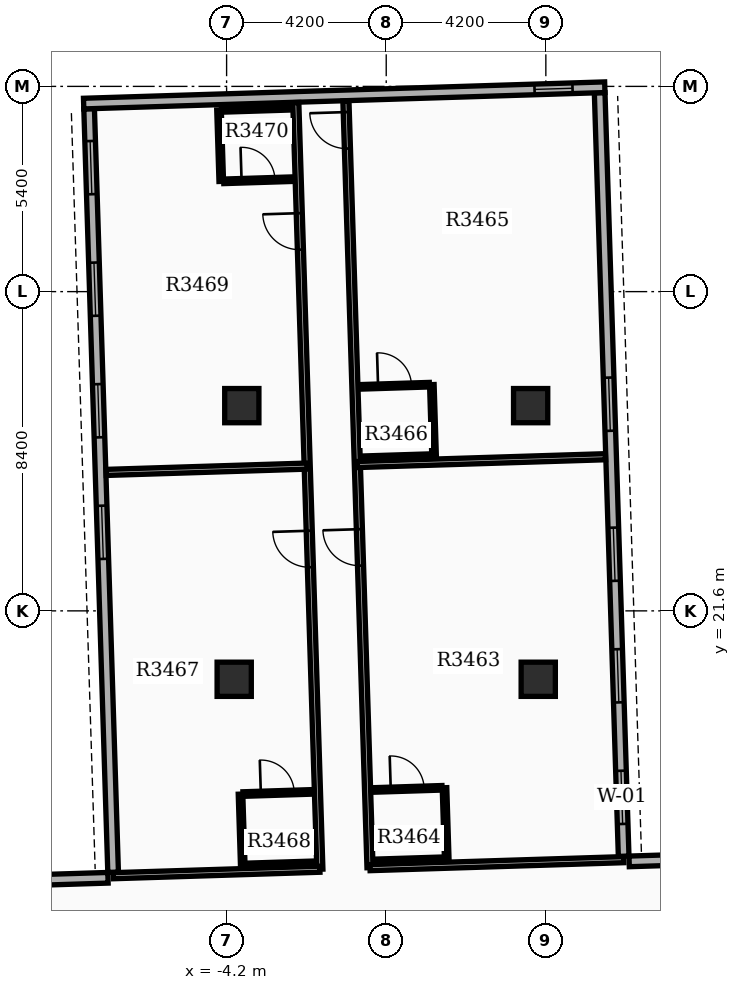
"""IFC4 building model, lengths in metres.
Left out: names, types, materials, properties, quantities, classifications, styles, units other than length and angle.
Written with IfcOpenShell. Run it as: python <this file> out.ifc"""

import sys

from ifc_helpers import new_model, si_unit, direction, frame, frame_2d, origin, origin_2d, place, context, subcontext, project, spatial, rectangle, extrude, element, fill, save


model = new_model("IFC4")
c1 = context("Model", 3, precision=1e-05, world=origin(), true_north=direction((0.0, 1.0)))
c2 = subcontext(c1, "Body", "Model", "MODEL_VIEW")
j1 = project(units=[si_unit("LENGTHUNIT", "METRE"), si_unit("PLANEANGLEUNIT", "RADIAN")], contexts=[c1])
p1 = place(None, origin())
s1 = spatial("IfcSite", under=j1, at=p1, CompositionType="ELEMENT")
p2 = place(p1, origin())
s2 = spatial("IfcBuilding", under=s1, at=p2, CompositionType="ELEMENT")
p3 = place(p2, frame((0.0, 0.0, 216.9)))
s3 = spatial("IfcBuildingStorey", under=s2, at=p3, CompositionType="ELEMENT", Elevation=216.9)
for number, where, z_axis, x_axis in (
    (1, (-4.0, 19.8, 0.0), (0.0, 0.0, 1.0), (1.0, 0.0, 0.0)),
    (2, (4.0, 19.8, 0.0), (0.0, 0.0, 1.0), (1.0, 0.0, 0.0)),
    (3, (-3.8, 27.0, 0.0), (0.0, 0.0, 1.0), (1.0, 0.0, 0.0)),
    (4, (3.8, 27.0, 0.0), (0.0, 0.0, 1.0), (1.0, 0.0, 0.0)),
):
    element("IfcColumn", number, at=place(p3, frame(where, z_axis=z_axis, x_axis=x_axis)), inside=s3, PredefinedType="COLUMN", context=c2, shape_type="SweptSolid", body=[
        extrude(rectangle(XDim=0.9, YDim=0.9, at=origin_2d()), origin(), (0.0, 0.0, 1.0), 3.9),
    ])
p4 = place(p3, frame((6.247, 15.144, 0.0), z_axis=(0.0, 0.0, 1.0), x_axis=(-0.031398187845, 0.999506955354, 0.0)))
e5 = element("IfcWall", 5, at=p4, inside=s3, PredefinedType="STANDARD", context=c2, shape_type="SweptSolid", body=[
    extrude(rectangle(XDim=20.1, YDim=0.28, at=frame_2d((10.05, 0.0))), origin(), (0.0, 0.0, 1.0), 3.18),
])
p5 = place(p4, frame((0.85, 0.0, 0.8)))
e6 = element("IfcOpeningElement", 6, at=p5, cuts=e5, PredefinedType="OPENING", context=c2, shape_type="SweptSolid", body=[
    extrude(rectangle(XDim=1.4, YDim=1.6, at=frame_2d((0.7, 0.8))), frame((0.0, 0.15, 0.0), z_axis=(0.0, -1.0, 0.0), x_axis=(1.0, 0.0, 0.0)), (0.0, 0.0, 1.0), 0.3),
])
p6 = place(p4, frame((4.05, 0.0, 0.8)))
e7 = element("IfcOpeningElement", 7, at=p6, cuts=e5, PredefinedType="OPENING", context=c2, shape_type="SweptSolid", body=[
    extrude(rectangle(XDim=1.4, YDim=1.6, at=frame_2d((0.7, 0.8))), frame((0.0, 0.15, 0.0), z_axis=(0.0, -1.0, 0.0), x_axis=(1.0, 0.0, 0.0)), (0.0, 0.0, 1.0), 0.3),
])
p7 = place(p4, frame((7.25, 0.0, 0.8)))
e8 = element("IfcOpeningElement", 8, at=p7, cuts=e5, PredefinedType="OPENING", context=c2, shape_type="SweptSolid", body=[
    extrude(rectangle(XDim=1.4, YDim=1.6, at=frame_2d((0.7, 0.8))), frame((0.0, 0.15, 0.0), z_axis=(0.0, -1.0, 0.0), x_axis=(1.0, 0.0, 0.0)), (0.0, 0.0, 1.0), 0.3),
])
p8 = place(p4, frame((11.2, 0.0, 0.8)))
e9 = element("IfcOpeningElement", 9, at=p8, cuts=e5, PredefinedType="OPENING", context=c2, shape_type="SweptSolid", body=[
    extrude(rectangle(XDim=1.4, YDim=1.6, at=frame_2d((0.7, 0.8))), frame((0.0, 0.15, 0.0), z_axis=(0.0, -1.0, 0.0), x_axis=(1.0, 0.0, 0.0)), (0.0, 0.0, 1.0), 0.3),
])
p9 = place(p3, frame((-7.817, 34.812, 0.0), z_axis=(0.0, 0.0, 1.0), x_axis=(0.031410322165, -0.999506574096, 0.0)))
e10 = element("IfcWall", 10, at=p9, inside=s3, PredefinedType="STANDARD", context=c2, shape_type="SweptSolid", body=[
    extrude(rectangle(XDim=20.1, YDim=0.28, at=frame_2d((10.05, 0.0))), origin(), (0.0, 0.0, 1.0), 3.18),
])
p10 = place(p9, frame((0.85, 0.0, 0.8)))
e11 = element("IfcOpeningElement", 11, at=p10, cuts=e10, PredefinedType="OPENING", context=c2, shape_type="SweptSolid", body=[
    extrude(rectangle(XDim=1.4, YDim=1.6, at=frame_2d((0.7, 0.8))), frame((0.0, 0.15, 0.0), z_axis=(0.0, -1.0, 0.0), x_axis=(1.0, 0.0, 0.0)), (0.0, 0.0, 1.0), 0.3),
])
p11 = place(p9, frame((4.05, 0.0, 0.8)))
e12 = element("IfcOpeningElement", 12, at=p11, cuts=e10, PredefinedType="OPENING", context=c2, shape_type="SweptSolid", body=[
    extrude(rectangle(XDim=1.4, YDim=1.6, at=frame_2d((0.7, 0.8))), frame((0.0, 0.15, 0.0), z_axis=(0.0, -1.0, 0.0), x_axis=(1.0, 0.0, 0.0)), (0.0, 0.0, 1.0), 0.3),
])
p12 = place(p9, frame((7.25, 0.0, 0.8)))
e13 = element("IfcOpeningElement", 13, at=p12, cuts=e10, PredefinedType="OPENING", context=c2, shape_type="SweptSolid", body=[
    extrude(rectangle(XDim=1.4, YDim=1.6, at=frame_2d((0.7, 0.8))), frame((0.0, 0.15, 0.0), z_axis=(0.0, -1.0, 0.0), x_axis=(1.0, 0.0, 0.0)), (0.0, 0.0, 1.0), 0.3),
])
p13 = place(p9, frame((10.45, 0.0, 0.8)))
e14 = element("IfcOpeningElement", 14, at=p13, cuts=e10, PredefinedType="OPENING", context=c2, shape_type="SweptSolid", body=[
    extrude(rectangle(XDim=1.4, YDim=1.6, at=frame_2d((0.7, 0.8))), frame((0.0, 0.15, 0.0), z_axis=(0.0, -1.0, 0.0), x_axis=(1.0, 0.0, 0.0)), (0.0, 0.0, 1.0), 0.3),
])
p14 = place(p3, frame((5.752, 35.378, 0.0), z_axis=(0.0, 0.0, 1.0), x_axis=(-0.999506679556, -0.031406966164, 0.0)))
e15 = element("IfcWall", 15, at=p14, inside=s3, PredefinedType="STANDARD", context=c2, shape_type="SweptSolid", body=[
    extrude(rectangle(XDim=13.72, YDim=0.28, at=frame_2d((6.86, 0.0))), origin(), (0.0, 0.0, 1.0), 3.18),
])
p15 = place(p14, frame((0.85, 0.0, 0.85)))
e16 = element("IfcOpeningElement", 16, at=p15, cuts=e15, PredefinedType="OPENING", context=c2, shape_type="SweptSolid", body=[
    extrude(rectangle(XDim=1.0, YDim=1.5, at=frame_2d((0.5, 0.75))), frame((0.0, 0.15, 0.0), z_axis=(0.0, -1.0, 0.0), x_axis=(1.0, 0.0, 0.0)), (0.0, 0.0, 1.0), 0.3),
])
p16 = place(p3, frame((12.689, 15.206, 0.0), z_axis=(0.0, 0.0, 1.0), x_axis=(-0.999507262922, -0.031388395416, 0.0)))
e17 = element("IfcWall", 17, at=p16, inside=s3, PredefinedType="STANDARD", context=c2, shape_type="SweptSolid", body=[
    extrude(rectangle(XDim=6.3, YDim=0.28, at=frame_2d((3.15, 0.0))), origin(), (0.0, 0.0, 1.0), 3.18),
])
p17 = place(p3, frame((-13.618, 14.379, 0.0), z_axis=(0.0, 0.0, 1.0), x_axis=(0.999507224741, 0.031389611199, 0.0)))
e18 = element("IfcWall", 18, at=p17, inside=s3, PredefinedType="STANDARD", context=c2, shape_type="SweptSolid", body=[
    extrude(rectangle(XDim=6.3, YDim=0.28, at=frame_2d((3.15, 0.0))), origin(), (0.0, 0.0, 1.0), 3.18),
])
p18 = place(p3, frame((-0.427, 14.844, 0.0), z_axis=(0.0, 0.0, 1.0), x_axis=(-0.031415650687, 0.999506406629, 0.0)))
e19 = element("IfcWall", 19, at=p18, inside=s3, PredefinedType="PARTITIONING", context=c2, shape_type="SweptSolid", body=[
    extrude(rectangle(XDim=20.182, YDim=0.16, at=frame_2d((10.091, 0.0))), origin(), (0.0, 0.0, 1.0), 3.17),
])
p19 = place(p18, frame((7.95, 0.0, 0.0)))
e20 = element("IfcOpeningElement", 20, at=p19, cuts=e19, PredefinedType="OPENING", context=c2, shape_type="SweptSolid", body=[
    extrude(rectangle(XDim=0.96, YDim=2.15, at=frame_2d((0.48, 1.075))), frame((0.0, 0.09, 0.0), z_axis=(0.0, -1.0, 0.0), x_axis=(1.0, 0.0, 0.0)), (0.0, 0.0, 1.0), 0.18),
])
p20 = place(p18, frame((18.93, 0.0, 0.0)))
e21 = element("IfcOpeningElement", 21, at=p20, cuts=e19, PredefinedType="OPENING", context=c2, shape_type="SweptSolid", body=[
    extrude(rectangle(XDim=0.96, YDim=2.15, at=frame_2d((0.48, 1.075))), frame((0.0, 0.09, 0.0), z_axis=(0.0, -1.0, 0.0), x_axis=(1.0, 0.0, 0.0)), (0.0, 0.0, 1.0), 0.18),
])
p21 = place(p3, frame((-0.427, 14.844, 0.0), z_axis=(0.0, 0.0, 1.0), x_axis=(0.999507071439, 0.031394492261, 0.0)))
e22 = element("IfcWall", 22, at=p21, inside=s3, PredefinedType="PARTITIONING", context=c2, shape_type="SweptSolid", body=[
    extrude(rectangle(XDim=6.68, YDim=0.16, at=frame_2d((3.34, 0.0))), origin(), (0.0, 0.0, 1.0), 3.17),
])
p22 = place(p3, frame((-0.76, 25.451, 0.0), z_axis=(0.0, 0.0, 1.0), x_axis=(0.999505857476, 0.031433117423, 0.0)))
e23 = element("IfcWall", 23, at=p22, inside=s3, PredefinedType="PARTITIONING", context=c2, shape_type="SweptSolid", body=[
    extrude(rectangle(XDim=6.532, YDim=0.16, at=frame_2d((3.266, 0.0))), origin(), (0.0, 0.0, 1.0), 3.17),
])
p23 = place(p3, frame((-0.351, 16.887, 0.0), z_axis=(0.0, 0.0, 1.0), x_axis=(0.999503004171, 0.03152371574, 0.0)))
e24 = element("IfcWall", 24, at=p23, inside=s3, PredefinedType="PARTITIONING", context=c2, shape_type="SweptSolid", body=[
    extrude(rectangle(XDim=1.82, YDim=0.12, at=frame_2d((0.91, 0.0))), origin(), (0.0, 0.0, 1.0), 3.17),
])
p24 = place(p23, frame((0.47, 0.0, 0.0)))
e25 = element("IfcOpeningElement", 25, at=p24, cuts=e24, PredefinedType="OPENING", context=c2, shape_type="SweptSolid", body=[
    extrude(rectangle(XDim=0.88, YDim=2.1, at=frame_2d((0.44, 1.05))), frame((0.0, 0.07, 0.0), z_axis=(0.0, -1.0, 0.0), x_axis=(1.0, 0.0, 0.0)), (0.0, 0.0, 1.0), 0.14),
])
p25 = place(p3, frame((-0.292, 15.008, 0.0), z_axis=(0.0, 0.0, 1.0), x_axis=(0.999507221803, 0.031389704724, 0.0)))
e26 = element("IfcWall", 26, at=p25, inside=s3, PredefinedType="PARTITIONING", context=c2, shape_type="SweptSolid", body=[
    extrude(rectangle(XDim=1.82, YDim=0.12, at=frame_2d((0.91, 0.0))), origin(), (0.0, 0.0, 1.0), 3.17),
])
p26 = place(p3, frame((1.593, 15.067, 0.0), z_axis=(0.0, 0.0, 1.0), x_axis=(-0.031425292588, 0.999506103526, 0.0)))
e27 = element("IfcWall", 27, at=p26, inside=s3, PredefinedType="PARTITIONING", context=c2, shape_type="SweptSolid", body=[
    extrude(rectangle(XDim=1.88, YDim=0.12, at=frame_2d((0.94, 0.0))), origin(), (0.0, 0.0, 1.0), 3.17),
])
p27 = place(p3, frame((-0.684, 27.494, 0.0), z_axis=(0.0, 0.0, 1.0), x_axis=(0.999507221803, 0.031389704724, 0.0)))
e28 = element("IfcWall", 28, at=p27, inside=s3, PredefinedType="PARTITIONING", context=c2, shape_type="SweptSolid", body=[
    extrude(rectangle(XDim=1.82, YDim=0.12, at=frame_2d((0.91, 0.0))), origin(), (0.0, 0.0, 1.0), 3.17),
])
p28 = place(p27, frame((0.47, 0.0, 0.0)))
e29 = element("IfcOpeningElement", 29, at=p28, cuts=e28, PredefinedType="OPENING", context=c2, shape_type="SweptSolid", body=[
    extrude(rectangle(XDim=0.88, YDim=2.1, at=frame_2d((0.44, 1.05))), frame((0.0, 0.07, 0.0), z_axis=(0.0, -1.0, 0.0), x_axis=(1.0, 0.0, 0.0)), (0.0, 0.0, 1.0), 0.14),
])
p29 = place(p3, frame((-0.625, 25.615, 0.0), z_axis=(0.0, 0.0, 1.0), x_axis=(0.999507221803, 0.031389704724, 0.0)))
e30 = element("IfcWall", 30, at=p29, inside=s3, PredefinedType="PARTITIONING", context=c2, shape_type="SweptSolid", body=[
    extrude(rectangle(XDim=1.82, YDim=0.12, at=frame_2d((0.91, 0.0))), origin(), (0.0, 0.0, 1.0), 3.17),
])
p30 = place(p3, frame((1.259, 25.674, 0.0), z_axis=(0.0, 0.0, 1.0), x_axis=(-0.031429371883, 0.999505975261, 0.0)))
e31 = element("IfcWall", 31, at=p30, inside=s3, PredefinedType="PARTITIONING", context=c2, shape_type="SweptSolid", body=[
    extrude(rectangle(XDim=1.88, YDim=0.12, at=frame_2d((0.94, 0.0))), origin(), (0.0, 0.0, 1.0), 3.17),
])
p31 = place(p3, frame((-1.746, 14.802, 0.0), z_axis=(0.0, 0.0, 1.0), x_axis=(-0.031415650687, 0.999506406629, 0.0)))
e32 = element("IfcWall", 32, at=p31, inside=s3, PredefinedType="PARTITIONING", context=c2, shape_type="SweptSolid", body=[
    extrude(rectangle(XDim=20.182, YDim=0.16, at=frame_2d((10.091, 0.0))), origin(), (0.0, 0.0, 1.0), 3.17),
])
p32 = place(p31, frame((7.95, 0.0, 0.0)))
e33 = element("IfcOpeningElement", 33, at=p32, cuts=e32, PredefinedType="OPENING", context=c2, shape_type="SweptSolid", body=[
    extrude(rectangle(XDim=0.96, YDim=2.15, at=frame_2d((0.48, 1.075))), frame((0.0, 0.09, 0.0), z_axis=(0.0, -1.0, 0.0), x_axis=(1.0, 0.0, 0.0)), (0.0, 0.0, 1.0), 0.18),
])
p33 = place(p31, frame((16.31, 0.0, 0.0)))
e34 = element("IfcOpeningElement", 34, at=p33, cuts=e32, PredefinedType="OPENING", context=c2, shape_type="SweptSolid", body=[
    extrude(rectangle(XDim=0.96, YDim=2.15, at=frame_2d((0.48, 1.075))), frame((0.0, 0.09, 0.0), z_axis=(0.0, -1.0, 0.0), x_axis=(1.0, 0.0, 0.0)), (0.0, 0.0, 1.0), 0.18),
])
p34 = place(p3, frame((-1.746, 14.802, 0.0), z_axis=(0.0, 0.0, 1.0), x_axis=(-0.999506411524, -0.031415494952, 0.0)))
e35 = element("IfcWall", 35, at=p34, inside=s3, PredefinedType="PARTITIONING", context=c2, shape_type="SweptSolid", body=[
    extrude(rectangle(XDim=5.44, YDim=0.16, at=frame_2d((2.72, 0.0))), origin(), (0.0, 0.0, 1.0), 3.17),
])
p35 = place(p3, frame((-2.079, 25.409, 0.0), z_axis=(0.0, 0.0, 1.0), x_axis=(-0.999506388694, -0.031416221301, 0.0)))
e36 = element("IfcWall", 36, at=p35, inside=s3, PredefinedType="PARTITIONING", context=c2, shape_type="SweptSolid", body=[
    extrude(rectangle(XDim=5.292, YDim=0.16, at=frame_2d((2.646, 0.0))), origin(), (0.0, 0.0, 1.0), 3.17),
])
p36 = place(p3, frame((-3.769, 16.78, 0.0), z_axis=(0.0, 0.0, 1.0), x_axis=(0.999503004171, 0.03152371574, 0.0)))
e37 = element("IfcWall", 37, at=p36, inside=s3, PredefinedType="PARTITIONING", context=c2, shape_type="SweptSolid", body=[
    extrude(rectangle(XDim=1.82, YDim=0.12, at=frame_2d((0.91, 0.0))), origin(), (0.0, 0.0, 1.0), 3.17),
])
p37 = place(p36, frame((0.47, 0.0, 0.0)))
e38 = element("IfcOpeningElement", 38, at=p37, cuts=e37, PredefinedType="OPENING", context=c2, shape_type="SweptSolid", body=[
    extrude(rectangle(XDim=0.88, YDim=2.1, at=frame_2d((0.44, 1.05))), frame((0.0, 0.07, 0.0), z_axis=(0.0, -1.0, 0.0), x_axis=(1.0, 0.0, 0.0)), (0.0, 0.0, 1.0), 0.14),
])
p38 = place(p3, frame((-3.71, 14.901, 0.0), z_axis=(0.0, 0.0, 1.0), x_axis=(0.999507221803, 0.031389704724, 0.0)))
e39 = element("IfcWall", 39, at=p38, inside=s3, PredefinedType="PARTITIONING", context=c2, shape_type="SweptSolid", body=[
    extrude(rectangle(XDim=1.82, YDim=0.12, at=frame_2d((0.91, 0.0))), origin(), (0.0, 0.0, 1.0), 3.17),
])
p39 = place(p3, frame((-3.775, 14.899, 0.0), z_axis=(0.0, 0.0, 1.0), x_axis=(-0.031425292588, 0.999506103526, 0.0)))
e40 = element("IfcWall", 40, at=p39, inside=s3, PredefinedType="PARTITIONING", context=c2, shape_type="SweptSolid", body=[
    extrude(rectangle(XDim=1.88, YDim=0.12, at=frame_2d((0.94, 0.0))), origin(), (0.0, 0.0, 1.0), 3.17),
])
p40 = place(p3, frame((-4.276, 32.902, 0.0), z_axis=(0.0, 0.0, 1.0), x_axis=(0.999507221803, 0.031389704724, 0.0)))
e41 = element("IfcWall", 41, at=p40, inside=s3, PredefinedType="PARTITIONING", context=c2, shape_type="SweptSolid", body=[
    extrude(rectangle(XDim=1.82, YDim=0.12, at=frame_2d((0.91, 0.0))), origin(), (0.0, 0.0, 1.0), 3.17),
])
p41 = place(p40, frame((0.47, 0.0, 0.0)))
e42 = element("IfcOpeningElement", 42, at=p41, cuts=e41, PredefinedType="OPENING", context=c2, shape_type="SweptSolid", body=[
    extrude(rectangle(XDim=0.88, YDim=2.1, at=frame_2d((0.44, 1.05))), frame((0.0, 0.07, 0.0), z_axis=(0.0, -1.0, 0.0), x_axis=(1.0, 0.0, 0.0)), (0.0, 0.0, 1.0), 0.14),
])
p42 = place(p3, frame((-4.335, 34.781, 0.0), z_axis=(0.0, 0.0, 1.0), x_axis=(0.999507353951, 0.031385496622, 0.0)))
e43 = element("IfcWall", 43, at=p42, inside=s3, PredefinedType="PARTITIONING", context=c2, shape_type="SweptSolid", body=[
    extrude(rectangle(XDim=1.82, YDim=0.12, at=frame_2d((0.91, 0.0))), origin(), (0.0, 0.0, 1.0), 3.17),
])
p43 = place(p3, frame((-4.341, 32.9, 0.0), z_axis=(0.0, 0.0, 1.0), x_axis=(-0.031425292588, 0.999506103526, 0.0)))
e44 = element("IfcWall", 44, at=p43, inside=s3, PredefinedType="PARTITIONING", context=c2, shape_type="SweptSolid", body=[
    extrude(rectangle(XDim=1.88, YDim=0.12, at=frame_2d((0.94, 0.0))), origin(), (0.0, 0.0, 1.0), 3.17),
])
p44 = place(p5, origin())
e45 = element("IfcWindow", 45, at=p44, inside=s3, PartitioningType="SINGLE_PANEL", PredefinedType="WINDOW", context=c2, shape_type="SweptSolid", body=[
    extrude(rectangle(XDim=1.4, YDim=1.6, at=frame_2d((0.7, 0.8))), frame((0.0, 0.03, 0.0), z_axis=(0.0, -1.0, 0.0), x_axis=(1.0, 0.0, 0.0)), (0.0, 0.0, 1.0), 0.06),
])
fill(e6, e45)
p45 = place(p6, origin())
e46 = element("IfcWindow", 46, at=p45, inside=s3, PartitioningType="SINGLE_PANEL", PredefinedType="WINDOW", context=c2, shape_type="SweptSolid", body=[
    extrude(rectangle(XDim=1.4, YDim=1.6, at=frame_2d((0.7, 0.8))), frame((0.0, 0.03, 0.0), z_axis=(0.0, -1.0, 0.0), x_axis=(1.0, 0.0, 0.0)), (0.0, 0.0, 1.0), 0.06),
])
fill(e7, e46)
p46 = place(p7, origin())
e47 = element("IfcWindow", 47, at=p46, inside=s3, PartitioningType="SINGLE_PANEL", PredefinedType="WINDOW", context=c2, shape_type="SweptSolid", body=[
    extrude(rectangle(XDim=1.4, YDim=1.6, at=frame_2d((0.7, 0.8))), frame((0.0, 0.03, 0.0), z_axis=(0.0, -1.0, 0.0), x_axis=(1.0, 0.0, 0.0)), (0.0, 0.0, 1.0), 0.06),
])
fill(e8, e47)
p47 = place(p8, origin())
e48 = element("IfcWindow", 48, at=p47, inside=s3, PartitioningType="SINGLE_PANEL", PredefinedType="WINDOW", context=c2, shape_type="SweptSolid", body=[
    extrude(rectangle(XDim=1.4, YDim=1.6, at=frame_2d((0.7, 0.8))), frame((0.0, 0.03, 0.0), z_axis=(0.0, -1.0, 0.0), x_axis=(1.0, 0.0, 0.0)), (0.0, 0.0, 1.0), 0.06),
])
fill(e9, e48)
p48 = place(p10, origin())
e49 = element("IfcWindow", 49, at=p48, inside=s3, PartitioningType="SINGLE_PANEL", PredefinedType="WINDOW", context=c2, shape_type="SweptSolid", body=[
    extrude(rectangle(XDim=1.4, YDim=1.6, at=frame_2d((0.7, 0.8))), frame((0.0, 0.03, 0.0), z_axis=(0.0, -1.0, 0.0), x_axis=(1.0, 0.0, 0.0)), (0.0, 0.0, 1.0), 0.06),
])
fill(e11, e49)
p49 = place(p11, origin())
e50 = element("IfcWindow", 50, at=p49, inside=s3, PartitioningType="SINGLE_PANEL", PredefinedType="WINDOW", context=c2, shape_type="SweptSolid", body=[
    extrude(rectangle(XDim=1.4, YDim=1.6, at=frame_2d((0.7, 0.8))), frame((0.0, 0.03, 0.0), z_axis=(0.0, -1.0, 0.0), x_axis=(1.0, 0.0, 0.0)), (0.0, 0.0, 1.0), 0.06),
])
fill(e12, e50)
p50 = place(p12, origin())
e51 = element("IfcWindow", 51, at=p50, inside=s3, PartitioningType="SINGLE_PANEL", PredefinedType="WINDOW", context=c2, shape_type="SweptSolid", body=[
    extrude(rectangle(XDim=1.4, YDim=1.6, at=frame_2d((0.7, 0.8))), frame((0.0, 0.03, 0.0), z_axis=(0.0, -1.0, 0.0), x_axis=(1.0, 0.0, 0.0)), (0.0, 0.0, 1.0), 0.06),
])
fill(e13, e51)
p51 = place(p13, origin())
e52 = element("IfcWindow", 52, at=p51, inside=s3, PartitioningType="SINGLE_PANEL", PredefinedType="WINDOW", context=c2, shape_type="SweptSolid", body=[
    extrude(rectangle(XDim=1.4, YDim=1.6, at=frame_2d((0.7, 0.8))), frame((0.0, 0.03, 0.0), z_axis=(0.0, -1.0, 0.0), x_axis=(1.0, 0.0, 0.0)), (0.0, 0.0, 1.0), 0.06),
])
fill(e14, e52)
p52 = place(p15, origin())
e53 = element("IfcWindow", 53, at=p52, inside=s3, PartitioningType="SINGLE_PANEL", PredefinedType="WINDOW", context=c2, shape_type="SweptSolid", body=[
    extrude(rectangle(XDim=1.0, YDim=1.5, at=frame_2d((0.5, 0.75))), frame((0.0, 0.03, 0.0), z_axis=(0.0, -1.0, 0.0), x_axis=(1.0, 0.0, 0.0)), (0.0, 0.0, 1.0), 0.06),
])
fill(e16, e53)
p53 = place(p19, origin())
e54 = element("IfcDoor", 54, at=p53, inside=s3, OperationType="SINGLE_SWING_RIGHT", PredefinedType="DOOR", context=c2, shape_type="SweptSolid", body=[
    extrude(rectangle(XDim=0.96, YDim=2.15, at=frame_2d((0.48, 1.075))), frame((0.0, 0.025, 0.0), z_axis=(0.0, -1.0, 0.0), x_axis=(1.0, 0.0, 0.0)), (0.0, 0.0, 1.0), 0.05),
])
fill(e20, e54)
p54 = place(p24, origin())
e55 = element("IfcDoor", 55, at=p54, inside=s3, OperationType="SINGLE_SWING_LEFT", PredefinedType="DOOR", context=c2, shape_type="SweptSolid", body=[
    extrude(rectangle(XDim=0.88, YDim=2.1, at=frame_2d((0.44, 1.05))), frame((0.0, 0.025, 0.0), z_axis=(0.0, -1.0, 0.0), x_axis=(1.0, 0.0, 0.0)), (0.0, 0.0, 1.0), 0.05),
])
fill(e25, e55)
p55 = place(p20, origin())
e56 = element("IfcDoor", 56, at=p55, inside=s3, OperationType="SINGLE_SWING_RIGHT", PredefinedType="DOOR", context=c2, shape_type="SweptSolid", body=[
    extrude(rectangle(XDim=0.96, YDim=2.15, at=frame_2d((0.48, 1.075))), frame((0.0, 0.025, 0.0), z_axis=(0.0, -1.0, 0.0), x_axis=(1.0, 0.0, 0.0)), (0.0, 0.0, 1.0), 0.05),
])
fill(e21, e56)
p56 = place(p28, origin())
e57 = element("IfcDoor", 57, at=p56, inside=s3, OperationType="SINGLE_SWING_LEFT", PredefinedType="DOOR", context=c2, shape_type="SweptSolid", body=[
    extrude(rectangle(XDim=0.88, YDim=2.1, at=frame_2d((0.44, 1.05))), frame((0.0, 0.025, 0.0), z_axis=(0.0, -1.0, 0.0), x_axis=(1.0, 0.0, 0.0)), (0.0, 0.0, 1.0), 0.05),
])
fill(e29, e57)
p57 = place(p32, origin())
e58 = element("IfcDoor", 58, at=p57, inside=s3, OperationType="SINGLE_SWING_RIGHT", PredefinedType="DOOR", context=c2, shape_type="SweptSolid", body=[
    extrude(rectangle(XDim=0.96, YDim=2.15, at=frame_2d((0.48, 1.075))), frame((0.0, 0.025, 0.0), z_axis=(0.0, -1.0, 0.0), x_axis=(1.0, 0.0, 0.0)), (0.0, 0.0, 1.0), 0.05),
])
fill(e33, e58)
p58 = place(p37, origin())
e59 = element("IfcDoor", 59, at=p58, inside=s3, OperationType="SINGLE_SWING_LEFT", PredefinedType="DOOR", context=c2, shape_type="SweptSolid", body=[
    extrude(rectangle(XDim=0.88, YDim=2.1, at=frame_2d((0.44, 1.05))), frame((0.0, 0.025, 0.0), z_axis=(0.0, -1.0, 0.0), x_axis=(1.0, 0.0, 0.0)), (0.0, 0.0, 1.0), 0.05),
])
fill(e38, e59)
p59 = place(p33, origin())
e60 = element("IfcDoor", 60, at=p59, inside=s3, OperationType="SINGLE_SWING_RIGHT", PredefinedType="DOOR", context=c2, shape_type="SweptSolid", body=[
    extrude(rectangle(XDim=0.96, YDim=2.15, at=frame_2d((0.48, 1.075))), frame((0.0, 0.025, 0.0), z_axis=(0.0, -1.0, 0.0), x_axis=(1.0, 0.0, 0.0)), (0.0, 0.0, 1.0), 0.05),
])
fill(e34, e60)
p60 = place(p41, origin())
e61 = element("IfcDoor", 61, at=p60, inside=s3, OperationType="SINGLE_SWING_LEFT", PredefinedType="DOOR", context=c2, shape_type="SweptSolid", body=[
    extrude(rectangle(XDim=0.88, YDim=2.1, at=frame_2d((0.44, 1.05))), frame((0.0, 0.025, 0.0), z_axis=(0.0, -1.0, 0.0), x_axis=(1.0, 0.0, 0.0)), (0.0, 0.0, 1.0), 0.05),
])
fill(e42, e61)
save(model, sys.argv[1])
